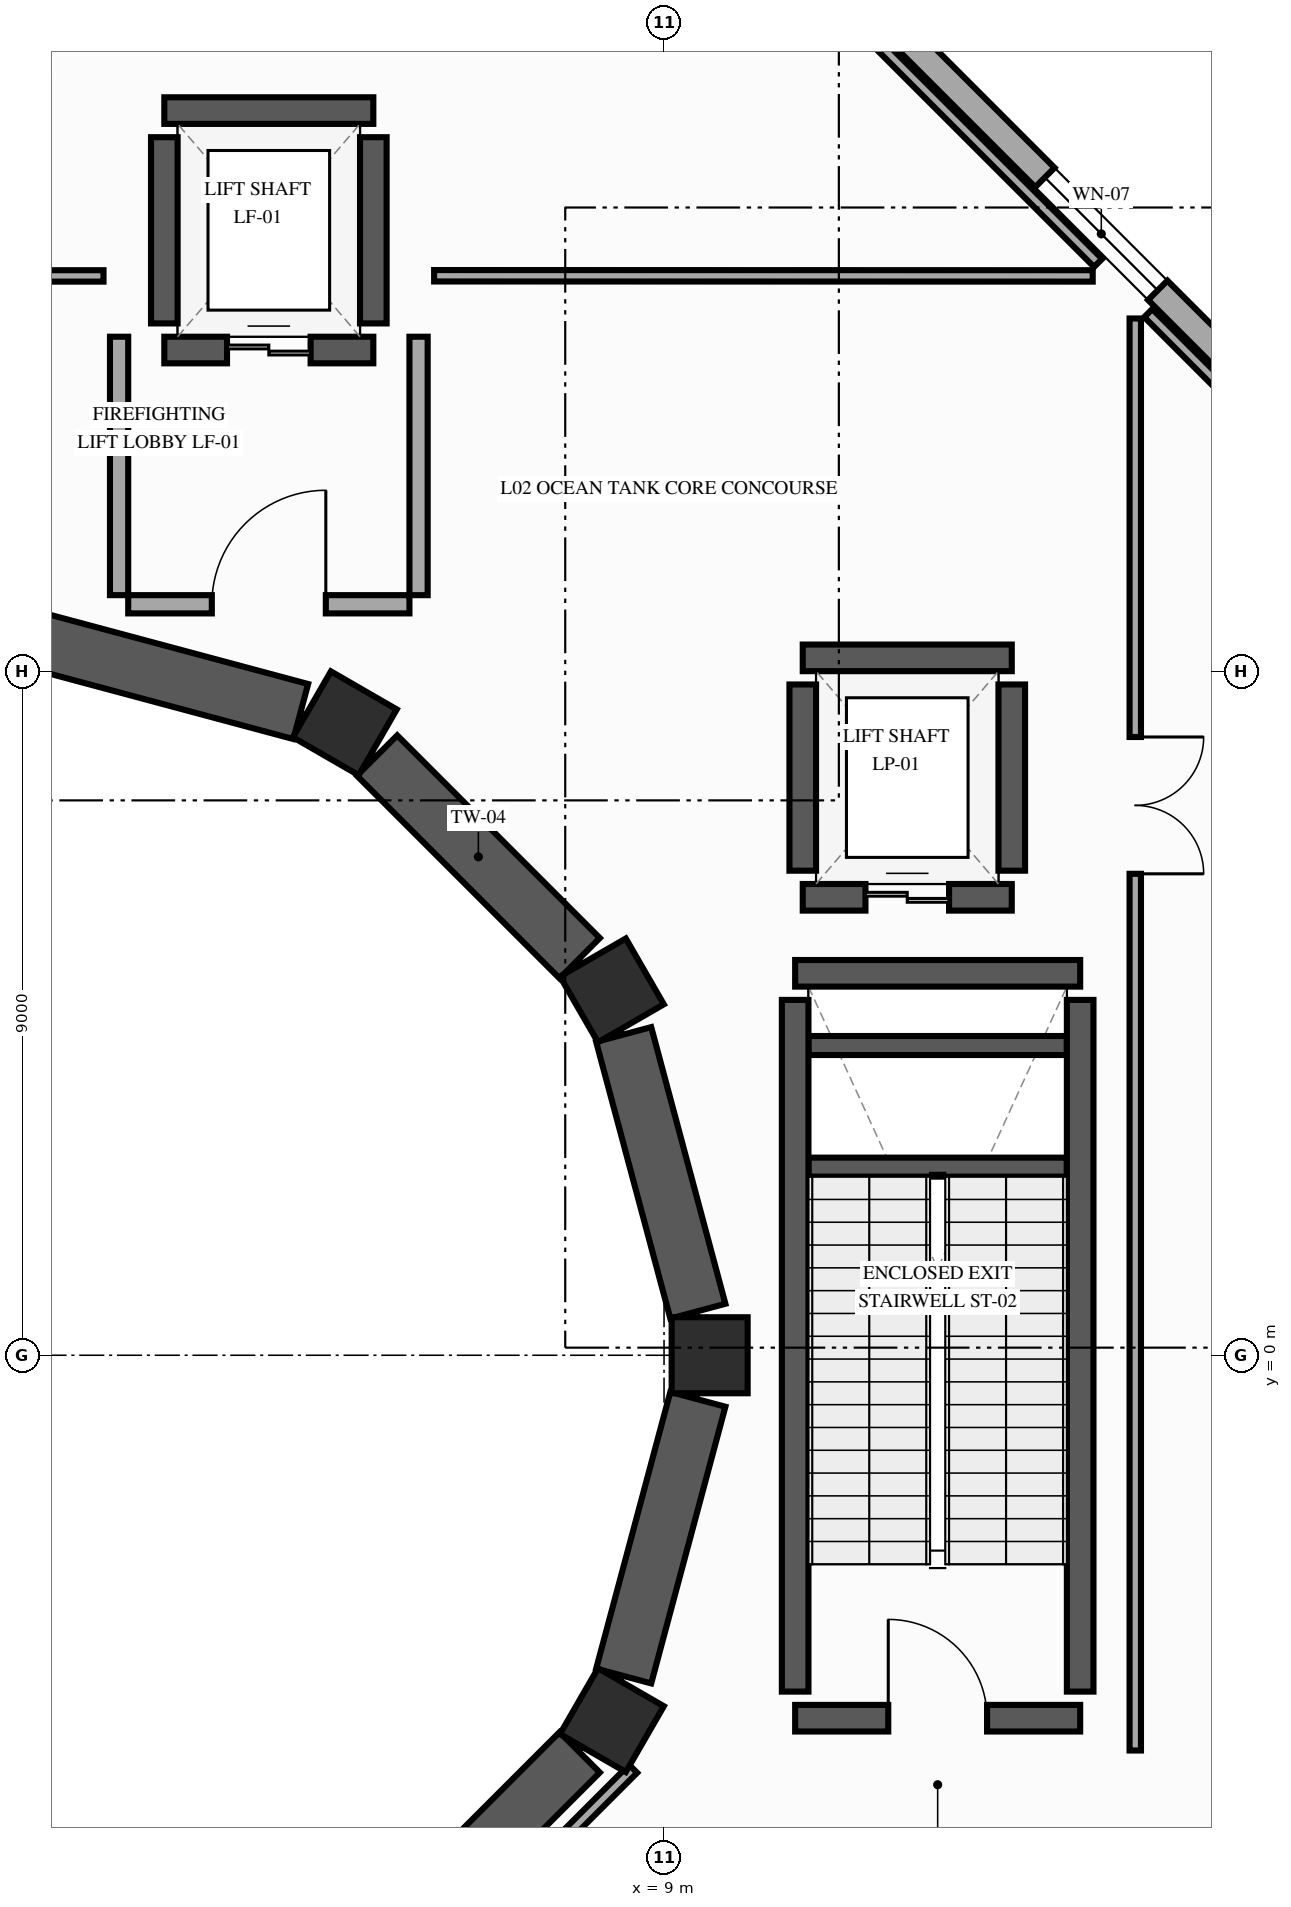
"""IFC4 building model, lengths in metres.
Left out: names, types, materials, properties, quantities, classifications, styles, units other than length and angle.
Written with IfcOpenShell. Run it as: python <this file> out.ifc"""

import sys

from ifc_helpers import new_model, si_unit, direction, frame, frame_2d, origin, origin_2d, place, context, subcontext, project, spatial, rectangle, extrude, element, fill, save


model = new_model("IFC4")
c1 = context("Model", 3, precision=1e-05, world=origin(), true_north=direction((0.0, 1.0)))
c2 = subcontext(c1, "Body", "Model", "MODEL_VIEW")
j1 = project(units=[si_unit("LENGTHUNIT", "METRE"), si_unit("PLANEANGLEUNIT", "RADIAN")], contexts=[c1])
p1 = place(None, origin())
s1 = spatial("IfcSite", under=j1, at=p1, CompositionType="ELEMENT")
p2 = place(p1, origin())
s2 = spatial("IfcBuilding", under=s1, at=p2, CompositionType="ELEMENT")
p3 = place(p2, frame((0.0, 0.0, 10.8)))
s3 = spatial("IfcBuildingStorey", under=s2, at=p3, CompositionType="ELEMENT", Elevation=10.8)
for number, where, z_axis, x_axis in (
    (1, (9.6, 0.0, 0.0), (0.0, 0.0, 1.0), (1.0, 0.0, 0.0)),
    (2, (8.314, 4.8, 0.0), (0.0, 0.0, 1.0), (0.866, 0.5, 0.0)),
    (3, (4.8, 8.314, 0.0), (0.0, 0.0, 1.0), (0.5, 0.866, 0.0)),
    (4, (8.314, -4.8, 0.0), (0.0, 0.0, 1.0), (0.866, -0.5, 0.0)),
):
    element("IfcColumn", number, at=place(p3, frame(where, z_axis=z_axis, x_axis=x_axis)), inside=s3, PredefinedType="COLUMN", context=c2, shape_type="SweptSolid", body=[
        extrude(rectangle(XDim=1.0, YDim=1.0, at=origin_2d()), origin(), (0.0, 0.0, 1.0), 5.4),
    ])
p4 = place(p3, frame((9.445, 0.58, 0.0), z_axis=(0.0, 0.0, 1.0), x_axis=(-0.259009169026, 0.965874862682, 0.0)))
e5 = element("IfcWall", 5, at=p4, inside=s3, PredefinedType="SHEAR", context=c2, shape_type="SweptSolid", body=[
    extrude(rectangle(XDim=3.769, YDim=0.75, at=frame_2d((1.884, 0.0))), origin(), (0.0, 0.0, 1.0), 5.16),
])
p5 = place(p3, frame((7.89, 5.224, 0.0), z_axis=(0.0, 0.0, 1.0), x_axis=(-0.707106781187, 0.707106781187, 0.0)))
e6 = element("IfcWall", 6, at=p5, inside=s3, PredefinedType="SHEAR", context=c2, shape_type="SweptSolid", body=[
    extrude(rectangle(XDim=3.77, YDim=0.75, at=frame_2d((1.885, 0.0))), origin(), (0.0, 0.0, 1.0), 5.16),
])
p6 = place(p3, frame((4.22, 8.469, 0.0), z_axis=(0.0, 0.0, 1.0), x_axis=(-0.965874862682, 0.259009169026, 0.0)))
e7 = element("IfcWall", 7, at=p6, inside=s3, PredefinedType="SHEAR", context=c2, shape_type="SweptSolid", body=[
    extrude(rectangle(XDim=3.769, YDim=0.75, at=frame_2d((1.884, 0.0))), origin(), (0.0, 0.0, 1.0), 5.16),
])
p7 = place(p3, frame((5.224, -7.89, 0.0), z_axis=(0.0, 0.0, 1.0), x_axis=(0.707106781187, 0.707106781187, 0.0)))
e8 = element("IfcWall", 8, at=p7, inside=s3, PredefinedType="SHEAR", context=c2, shape_type="SweptSolid", body=[
    extrude(rectangle(XDim=3.77, YDim=0.75, at=frame_2d((1.885, 0.0))), origin(), (0.0, 0.0, 1.0), 5.16),
])
p8 = place(p3, frame((8.469, -4.22, 0.0), z_axis=(0.0, 0.0, 1.0), x_axis=(0.259009169026, 0.965874862682, 0.0)))
e9 = element("IfcWall", 9, at=p8, inside=s3, PredefinedType="SHEAR", context=c2, shape_type="SweptSolid", body=[
    extrude(rectangle(XDim=3.769, YDim=0.75, at=frame_2d((1.884, 0.0))), origin(), (0.0, 0.0, 1.0), 5.16),
])
p9 = place(p3, frame((11.291, 18.215, 0.0), z_axis=(0.0, 0.0, 1.0), x_axis=(0.707106781187, -0.707106781187, 0.0)))
e10 = element("IfcWall", 10, at=p9, inside=s3, PredefinedType="SOLIDWALL", context=c2, shape_type="SweptSolid", body=[
    extrude(rectangle(XDim=9.792, YDim=0.36, at=frame_2d((4.896, 0.0))), origin(), (0.0, 0.0, 1.0), 4.395),
])
p10 = place(p9, frame((3.846, 0.0, 0.9)))
e11 = element("IfcOpeningElement", 11, at=p10, cuts=e10, PredefinedType="OPENING", context=c2, shape_type="SweptSolid", body=[
    extrude(rectangle(XDim=2.1, YDim=2.6, at=frame_2d((1.05, 1.3))), frame((0.0, 0.19, 0.0), z_axis=(0.0, -1.0, 0.0), x_axis=(1.0, 0.0, 0.0)), (0.0, 0.0, 1.0), 0.38),
])
for number, where, z_axis, x_axis in (
    (12, (10.9, 2.475, 0.0), (0.0, 0.0, 1.0), (1.0, 0.0, 0.0)),
    (13, (10.9, 4.075, 0.0), (0.0, 0.0, 1.0), (1.0, 0.0, 0.0)),
):
    element("IfcWall", number, at=place(p3, frame(where, z_axis=z_axis, x_axis=x_axis)), inside=s3, PredefinedType="SHEAR", context=c2, shape_type="SweptSolid", body=[
        extrude(rectangle(XDim=3.4, YDim=0.25, at=frame_2d((1.7, 0.0))), origin(), (0.0, 0.0, 1.0), 2.5),
    ])
p11 = place(p3, frame((10.725, -4.775, 0.0), z_axis=(0.0, 0.0, 1.0), x_axis=(1.0, 0.0, 0.0)))
e14 = element("IfcWall", 14, at=p11, inside=s3, PredefinedType="SHEAR", context=c2, shape_type="SweptSolid", body=[
    extrude(rectangle(XDim=3.75, YDim=0.35, at=frame_2d((1.875, 0.0))), origin(), (0.0, 0.0, 1.0), 5.16),
])
p12 = place(p11, frame((1.225, 0.0, 0.0)))
e15 = element("IfcOpeningElement", 15, at=p12, cuts=e14, PredefinedType="OPENING", context=c2, shape_type="SweptSolid", body=[
    extrude(rectangle(XDim=1.3, YDim=2.2, at=frame_2d((0.65, 1.1))), frame((0.0, 0.185, 0.0), z_axis=(0.0, -1.0, 0.0), x_axis=(1.0, 0.0, 0.0)), (0.0, 0.0, 1.0), 0.37),
])
p13 = place(p3, frame((10.725, 5.025, 0.0), z_axis=(0.0, 0.0, 1.0), x_axis=(1.0, 0.0, 0.0)))
e16 = element("IfcWall", 16, at=p13, inside=s3, PredefinedType="SHEAR", context=c2, shape_type="SweptSolid", body=[
    extrude(rectangle(XDim=3.75, YDim=0.35, at=frame_2d((1.875, 0.0))), origin(), (0.0, 0.0, 1.0), 5.16),
])
for number, where, z_axis, x_axis in (
    (17, (10.725, -4.425, 0.0), (0.0, 0.0, 1.0), (0.0, 1.0, 0.0)),
    (18, (14.475, -4.425, 0.0), (0.0, 0.0, 1.0), (0.0, 1.0, 0.0)),
):
    element("IfcWall", number, at=place(p3, frame(where, z_axis=z_axis, x_axis=x_axis)), inside=s3, PredefinedType="SHEAR", context=c2, shape_type="SweptSolid", body=[
        extrude(rectangle(XDim=9.1, YDim=0.35, at=frame_2d((4.55, 0.0))), origin(), (0.0, 0.0, 1.0), 5.16),
    ])
p14 = place(p3, frame((2.425, 13.225, 0.0), z_axis=(0.0, 0.0, 1.0), x_axis=(1.0, 0.0, 0.0)))
e19 = element("IfcWall", 19, at=p14, inside=s3, PredefinedType="SHEAR", context=c2, shape_type="SweptSolid", body=[
    extrude(rectangle(XDim=2.75, YDim=0.35, at=frame_2d((1.375, 0.0))), origin(), (0.0, 0.0, 1.0), 5.16),
])
p15 = place(p14, frame((0.825, 0.0, 0.0)))
e20 = element("IfcOpeningElement", 20, at=p15, cuts=e19, PredefinedType="OPENING", context=c2, shape_type="SweptSolid", body=[
    extrude(rectangle(XDim=1.1, YDim=2.2, at=frame_2d((0.55, 1.1))), frame((0.0, 0.185, 0.0), z_axis=(0.0, -1.0, 0.0), x_axis=(1.0, 0.0, 0.0)), (0.0, 0.0, 1.0), 0.37),
])
p16 = place(p3, frame((5.175, 16.375, 0.0), z_axis=(0.0, 0.0, 1.0), x_axis=(-1.0, 0.0, 0.0)))
e21 = element("IfcWall", 21, at=p16, inside=s3, PredefinedType="SHEAR", context=c2, shape_type="SweptSolid", body=[
    extrude(rectangle(XDim=2.75, YDim=0.35, at=frame_2d((1.375, 0.0))), origin(), (0.0, 0.0, 1.0), 5.16),
])
for number, where, z_axis, x_axis in (
    (22, (2.425, 13.575, 0.0), (0.0, 0.0, 1.0), (0.0, 1.0, 0.0)),
    (23, (5.175, 13.575, 0.0), (0.0, 0.0, 1.0), (0.0, 1.0, 0.0)),
):
    element("IfcWall", number, at=place(p3, frame(where, z_axis=z_axis, x_axis=x_axis)), inside=s3, PredefinedType="SHEAR", context=c2, shape_type="SweptSolid", body=[
        extrude(rectangle(XDim=2.45, YDim=0.35, at=frame_2d((1.225, 0.0))), origin(), (0.0, 0.0, 1.0), 5.16),
    ])
p17 = place(p3, frame((1.95, 9.88, 0.0), z_axis=(0.0, 0.0, 1.0), x_axis=(1.0, 0.0, 0.0)))
e24 = element("IfcWall", 24, at=p17, inside=s3, PredefinedType="PARTITIONING", context=c2, shape_type="SweptSolid", body=[
    extrude(rectangle(XDim=3.7, YDim=0.24, at=frame_2d((1.85, 0.0))), origin(), (0.0, 0.0, 1.0), 4.545),
])
p18 = place(p17, frame((1.1, 0.0, 0.0)))
e25 = element("IfcOpeningElement", 25, at=p18, cuts=e24, PredefinedType="OPENING", context=c2, shape_type="SweptSolid", body=[
    extrude(rectangle(XDim=1.5, YDim=2.2, at=frame_2d((0.75, 1.1))), frame((0.0, 0.13, 0.0), z_axis=(0.0, -1.0, 0.0), x_axis=(1.0, 0.0, 0.0)), (0.0, 0.0, 1.0), 0.26),
])
p19 = place(p3, frame((1.83, 10.0, 0.0), z_axis=(0.0, 0.0, 1.0), x_axis=(0.0, 1.0, 0.0)))
e26 = element("IfcWall", 26, at=p19, inside=s3, PredefinedType="PARTITIONING", context=c2, shape_type="SweptSolid", body=[
    extrude(rectangle(XDim=3.4, YDim=0.24, at=frame_2d((1.7, 0.0))), origin(), (0.0, 0.0, 1.0), 5.11),
])
p20 = place(p3, frame((5.77, 10.0, 0.0), z_axis=(0.0, 0.0, 1.0), x_axis=(0.0, 1.0, 0.0)))
e27 = element("IfcWall", 27, at=p20, inside=s3, PredefinedType="PARTITIONING", context=c2, shape_type="SweptSolid", body=[
    extrude(rectangle(XDim=3.4, YDim=0.24, at=frame_2d((1.7, 0.0))), origin(), (0.0, 0.0, 1.0), 4.545),
])
p21 = place(p3, frame((10.825, 6.025, 0.0), z_axis=(0.0, 0.0, 1.0), x_axis=(1.0, 0.0, 0.0)))
e28 = element("IfcWall", 28, at=p21, inside=s3, PredefinedType="SHEAR", context=c2, shape_type="SweptSolid", body=[
    extrude(rectangle(XDim=2.75, YDim=0.35, at=frame_2d((1.375, 0.0))), origin(), (0.0, 0.0, 1.0), 5.16),
])
p22 = place(p21, frame((0.825, 0.0, 0.0)))
e29 = element("IfcOpeningElement", 29, at=p22, cuts=e28, PredefinedType="OPENING", context=c2, shape_type="SweptSolid", body=[
    extrude(rectangle(XDim=1.1, YDim=2.2, at=frame_2d((0.55, 1.1))), frame((0.0, 0.185, 0.0), z_axis=(0.0, -1.0, 0.0), x_axis=(1.0, 0.0, 0.0)), (0.0, 0.0, 1.0), 0.37),
])
p23 = place(p3, frame((13.575, 9.175, 0.0), z_axis=(0.0, 0.0, 1.0), x_axis=(-1.0, 0.0, 0.0)))
e30 = element("IfcWall", 30, at=p23, inside=s3, PredefinedType="SHEAR", context=c2, shape_type="SweptSolid", body=[
    extrude(rectangle(XDim=2.75, YDim=0.35, at=frame_2d((1.375, 0.0))), origin(), (0.0, 0.0, 1.0), 5.16),
])
for number, where, z_axis, x_axis in (
    (31, (10.825, 6.375, 0.0), (0.0, 0.0, 1.0), (0.0, 1.0, 0.0)),
    (32, (13.575, 6.375, 0.0), (0.0, 0.0, 1.0), (0.0, 1.0, 0.0)),
):
    element("IfcWall", number, at=place(p3, frame(where, z_axis=z_axis, x_axis=x_axis)), inside=s3, PredefinedType="SHEAR", context=c2, shape_type="SweptSolid", body=[
        extrude(rectangle(XDim=2.45, YDim=0.35, at=frame_2d((1.225, 0.0))), origin(), (0.0, 0.0, 1.0), 5.16),
    ])
p24 = place(p3, frame((17.946, 11.135, 0.0), z_axis=(0.0, 0.0, 1.0), x_axis=(-0.706972707094, 0.707240829862, 0.0)))
e33 = element("IfcWall", 33, at=p24, inside=s3, PredefinedType="PARTITIONING", context=c2, shape_type="SweptSolid", body=[
    extrude(rectangle(XDim=3.642, YDim=0.15, at=frame_2d((1.821, 0.0))), origin(), (0.0, 0.0, 1.0), 4.395),
])
p25 = place(p3, frame((15.2, 13.64, 0.0), z_axis=(0.0, 0.0, 1.0), x_axis=(0.0, -1.0, 0.0)))
e34 = element("IfcWall", 34, at=p25, inside=s3, PredefinedType="PARTITIONING", context=c2, shape_type="SweptSolid", body=[
    extrude(rectangle(XDim=18.84, YDim=0.15, at=frame_2d((9.42, 0.0))), origin(), (0.0, 0.0, 1.0), 4.395),
])
p26 = place(p25, frame((5.506, 0.0, 0.0)))
e35 = element("IfcOpeningElement", 35, at=p26, cuts=e34, PredefinedType="OPENING", context=c2, shape_type="SweptSolid", body=[
    extrude(rectangle(XDim=1.8, YDim=2.3, at=frame_2d((0.9, 1.15))), frame((0.0, 0.085, 0.0), z_axis=(0.0, -1.0, 0.0), x_axis=(1.0, 0.0, 0.0)), (0.0, 0.0, 1.0), 0.17),
])
p27 = place(p3, frame((8.593, -5.44, 0.0), z_axis=(0.0, 0.0, 1.0), x_axis=(-0.707106781187, -0.707106781187, 0.0)))
e36 = element("IfcWall", 36, at=p27, inside=s3, PredefinedType="PARTITIONING", context=c2, shape_type="SweptSolid", body=[
    extrude(rectangle(XDim=4.459, YDim=0.15, at=frame_2d((2.229, 0.0))), origin(), (0.0, 0.0, 1.0), 4.545),
])
p28 = place(p3, frame((-14.64, 14.2, 0.0), z_axis=(0.0, 0.0, 1.0), x_axis=(1.0, 0.0, 0.0)))
e37 = element("IfcWall", 37, at=p28, inside=s3, PredefinedType="PARTITIONING", context=c2, shape_type="SweptSolid", body=[
    extrude(rectangle(XDim=16.265, YDim=0.15, at=frame_2d((8.132, 0.0))), origin(), (0.0, 0.0, 1.0), 4.395),
])
p29 = place(p28, frame((7.232, 0.0, 0.0)))
e38 = element("IfcOpeningElement", 38, at=p29, cuts=e37, PredefinedType="OPENING", context=c2, shape_type="SweptSolid", body=[
    extrude(rectangle(XDim=1.8, YDim=2.3, at=frame_2d((0.9, 1.15))), frame((0.0, 0.085, 0.0), z_axis=(0.0, -1.0, 0.0), x_axis=(1.0, 0.0, 0.0)), (0.0, 0.0, 1.0), 0.17),
])
p30 = place(p3, frame((5.975, 14.202, 0.0), z_axis=(0.0, 0.0, 1.0), x_axis=(0.999999974595, -0.000225409253, 0.0)))
e39 = element("IfcWall", 39, at=p30, inside=s3, PredefinedType="PARTITIONING", context=c2, shape_type="SweptSolid", body=[
    extrude(rectangle(XDim=8.665, YDim=0.15, at=frame_2d((4.333, 0.0))), origin(), (0.0, 0.0, 1.0), 4.395),
])
p31 = place(p3, frame((14.711, 14.371, 0.0), z_axis=(0.0, 0.0, 1.0), x_axis=(-0.707203340899, 0.707010208287, 0.0)))
e40 = element("IfcWall", 40, at=p31, inside=s3, PredefinedType="PARTITIONING", context=c2, shape_type="SweptSolid", body=[
    extrude(rectangle(XDim=5.056, YDim=0.15, at=frame_2d((2.528, 0.0))), origin(), (0.0, 0.0, 1.0), 4.395),
])
p32 = place(p10, origin())
e41 = element("IfcWindow", 41, at=p32, inside=s3, PartitioningType="SINGLE_PANEL", PredefinedType="WINDOW", context=c2, shape_type="SweptSolid", body=[
    extrude(rectangle(XDim=2.1, YDim=2.6, at=frame_2d((1.05, 1.3))), frame((0.0, 0.03, 0.0), z_axis=(0.0, -1.0, 0.0), x_axis=(1.0, 0.0, 0.0)), (0.0, 0.0, 1.0), 0.06),
])
fill(e11, e41)
p33 = place(p12, origin())
e42 = element("IfcDoor", 42, at=p33, inside=s3, OperationType="SINGLE_SWING_LEFT", PredefinedType="DOOR", context=c2, shape_type="SweptSolid", body=[
    extrude(rectangle(XDim=1.3, YDim=2.2, at=frame_2d((0.65, 1.1))), frame((0.0, 0.025, 0.0), z_axis=(0.0, -1.0, 0.0), x_axis=(1.0, 0.0, 0.0)), (0.0, 0.0, 1.0), 0.05),
])
fill(e15, e42)
p34 = place(p15, origin())
e43 = element("IfcDoor", 43, at=p34, inside=s3, OperationType="DOUBLE_DOOR_SLIDING", PredefinedType="DOOR", context=c2, shape_type="SweptSolid", body=[
    extrude(rectangle(XDim=1.1, YDim=2.2, at=frame_2d((0.55, 1.1))), frame((0.0, 0.025, 0.0), z_axis=(0.0, -1.0, 0.0), x_axis=(1.0, 0.0, 0.0)), (0.0, 0.0, 1.0), 0.05),
])
fill(e20, e43)
p35 = place(p18, origin())
e44 = element("IfcDoor", 44, at=p35, inside=s3, OperationType="SINGLE_SWING_RIGHT", PredefinedType="DOOR", context=c2, shape_type="SweptSolid", body=[
    extrude(rectangle(XDim=1.5, YDim=2.2, at=frame_2d((0.75, 1.1))), frame((0.0, 0.025, 0.0), z_axis=(0.0, -1.0, 0.0), x_axis=(1.0, 0.0, 0.0)), (0.0, 0.0, 1.0), 0.05),
])
fill(e25, e44)
p36 = place(p22, origin())
e45 = element("IfcDoor", 45, at=p36, inside=s3, OperationType="DOUBLE_DOOR_SLIDING", PredefinedType="DOOR", context=c2, shape_type="SweptSolid", body=[
    extrude(rectangle(XDim=1.1, YDim=2.2, at=frame_2d((0.55, 1.1))), frame((0.0, 0.025, 0.0), z_axis=(0.0, -1.0, 0.0), x_axis=(1.0, 0.0, 0.0)), (0.0, 0.0, 1.0), 0.05),
])
fill(e29, e45)
p37 = place(p26, origin())
e46 = element("IfcDoor", 46, at=p37, inside=s3, OperationType="DOUBLE_DOOR_SINGLE_SWING", PredefinedType="DOOR", context=c2, shape_type="SweptSolid", body=[
    extrude(rectangle(XDim=1.8, YDim=2.3, at=frame_2d((0.9, 1.15))), frame((0.0, 0.025, 0.0), z_axis=(0.0, -1.0, 0.0), x_axis=(1.0, 0.0, 0.0)), (0.0, 0.0, 1.0), 0.05),
])
fill(e35, e46)
save(model, sys.argv[1])
